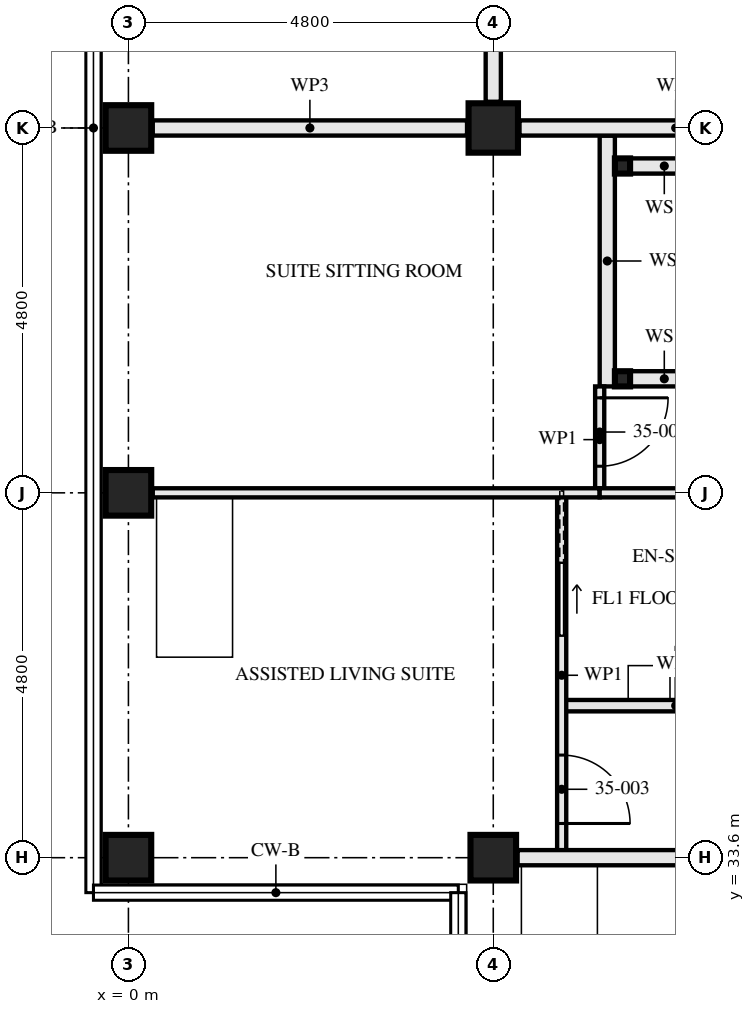
"""IFC4 building model, lengths in metres.
Left out: names, types, materials, properties, quantities, classifications, styles, units other than length and angle.
Written with IfcOpenShell. Run it as: python <this file> out.ifc"""

import sys

from ifc_helpers import new_model, si_unit, direction, frame, frame_2d, origin, origin_2d, place, context, subcontext, project, spatial, rectangle, hollow_rectangle, extrude, element, fill, save


model = new_model("IFC4")
c1 = context("Model", 3, precision=1e-05, world=origin(), true_north=direction((0.0, 1.0)))
c2 = subcontext(c1, "Body", "Model", "MODEL_VIEW")
j1 = project(units=[si_unit("LENGTHUNIT", "METRE"), si_unit("PLANEANGLEUNIT", "RADIAN")], contexts=[c1])
p1 = place(None, origin())
s1 = spatial("IfcSite", under=j1, at=p1, CompositionType="ELEMENT")
p2 = place(p1, origin())
s2 = spatial("IfcBuilding", under=s1, at=p2, CompositionType="ELEMENT")
p3 = place(p2, frame((0.0, 0.0, 129.5)))
s3 = spatial("IfcBuildingStorey", under=s2, at=p3, CompositionType="ELEMENT", Elevation=129.5)
for number, where, z_axis, x_axis in (
    (1, (0.0, 33.6, 0.0), (0.0, 0.0, 1.0), (0.0, 1.0, 0.0)),
    (2, (0.0, 38.4, 0.0), (0.0, 0.0, 1.0), (1.0, 0.0, 0.0)),
    (3, (0.0, 43.2, 0.0), (0.0, 0.0, 1.0), (0.0, 1.0, 0.0)),
    (4, (4.8, 33.6, 0.0), (0.0, 0.0, 1.0), (0.0, 1.0, 0.0)),
):
    element("IfcColumn", number, at=place(p3, frame(where, z_axis=z_axis, x_axis=x_axis)), inside=s3, PredefinedType="COLUMN", context=c2, shape_type="SweptSolid", body=[
        extrude(hollow_rectangle(XDim=0.6, YDim=0.6, WallThickness=0.08, at=origin_2d()), origin(), (0.0, 0.0, 1.0), 3.5),
    ])
p4 = place(p3, frame((4.8, 43.2, 0.0), z_axis=(0.0, 0.0, 1.0), x_axis=(0.0, 1.0, 0.0)))
e5 = element("IfcColumn", 5, at=p4, inside=s3, PredefinedType="COLUMN", context=c2, shape_type="SweptSolid", body=[
    extrude(hollow_rectangle(XDim=0.65, YDim=0.65, WallThickness=0.05, at=origin_2d()), origin(), (0.0, 0.0, 1.0), 3.5),
])
for number, where, z_axis, x_axis in (
    (6, (6.5, 42.7, 0.0), (0.0, 0.0, 1.0), (1.0, 0.0, 0.0)),
    (7, (6.5, 39.9, 0.0), (0.0, 0.0, 1.0), (1.0, 0.0, 0.0)),
):
    element("IfcColumn", number, at=place(p3, frame(where, z_axis=z_axis, x_axis=x_axis)), inside=s3, PredefinedType="COLUMN", context=c2, shape_type="SweptSolid", body=[
        extrude(hollow_rectangle(XDim=0.2, YDim=0.2, WallThickness=0.008, at=origin_2d()), origin(), (0.0, 0.0, 1.0), 3.33),
    ])
for number, where, z_axis, x_axis in (
    (8, (6.6, 42.7, 0.0), (0.0, 0.0, 1.0), (1.0, 0.0, 0.0)),
    (9, (6.6, 39.9, 0.0), (0.0, 0.0, 1.0), (1.0, 0.0, 0.0)),
):
    element("IfcWall", number, at=place(p3, frame(where, z_axis=z_axis, x_axis=x_axis)), inside=s3, PredefinedType="SOLIDWALL", context=c2, shape_type="SweptSolid", body=[
        extrude(rectangle(XDim=0.9, YDim=0.2, at=frame_2d((0.45, 0.0))), origin(), (0.0, 0.0, 1.0), 2.99),
    ])
p5 = place(p3, frame((6.3, 43.1, 0.0), z_axis=(0.0, 0.0, 1.0), x_axis=(0.0, -1.0, 0.0)))
e10 = element("IfcWall", 10, at=p5, inside=s3, PredefinedType="SOLIDWALL", context=c2, shape_type="SweptSolid", body=[
    extrude(rectangle(XDim=3.3, YDim=0.2, at=frame_2d((1.65, 0.0))), origin(), (0.0, 0.0, 1.0), 3.33),
])
p6 = place(p3, frame((5.7, 35.6, 0.0), z_axis=(0.0, 0.0, 1.0), x_axis=(1.0, 0.0, 0.0)))
e11 = element("IfcWall", 11, at=p6, inside=s3, PredefinedType="PARTITIONING", context=c2, shape_type="SweptSolid", body=[
    extrude(rectangle(XDim=3.0, YDim=0.15, at=frame_2d((1.5, 0.0))), origin(), (0.0, 0.0, 1.0), 3.33),
])
p7 = place(p3, frame((6.2, 38.4, 0.0), z_axis=(0.0, 0.0, 1.0), x_axis=(1.0, 0.0, 0.0)))
e12 = element("IfcWall", 12, at=p7, inside=s3, PredefinedType="PARTITIONING", context=c2, shape_type="SweptSolid", body=[
    extrude(rectangle(XDim=6.25, YDim=0.12, at=frame_2d((3.125, 0.0))), origin(), (0.0, 0.0, 1.0), 2.55),
])
p8 = place(p7, frame((3.9, 0.0, 0.0)))
e13 = element("IfcOpeningElement", 13, at=p8, cuts=e12, PredefinedType="OPENING", context=c2, shape_type="SweptSolid", body=[
    extrude(rectangle(XDim=0.9, YDim=2.1, at=frame_2d((0.45, 1.05))), frame((0.0, 0.071, 0.0), z_axis=(0.0, -1.0, 0.0), x_axis=(1.0, 0.0, 0.0)), (0.0, 0.0, 1.0), 0.141),
])
p9 = place(p3, frame((6.2, 39.8, 0.0), z_axis=(0.0, 0.0, 1.0), x_axis=(0.0, -1.0, 0.0)))
e14 = element("IfcWall", 14, at=p9, inside=s3, PredefinedType="PARTITIONING", context=c2, shape_type="SweptSolid", body=[
    extrude(rectangle(XDim=1.4, YDim=0.12, at=frame_2d((0.7, 0.0))), origin(), (0.0, 0.0, 1.0), 3.33),
])
p10 = place(p9, frame((0.15, 0.0, 0.0)))
e15 = element("IfcOpeningElement", 15, at=p10, cuts=e14, PredefinedType="OPENING", context=c2, shape_type="SweptSolid", body=[
    extrude(rectangle(XDim=0.9, YDim=2.1, at=frame_2d((0.45, 1.05))), frame((0.0, 0.071, 0.0), z_axis=(0.0, -1.0, 0.0), x_axis=(1.0, 0.0, 0.0)), (0.0, 0.0, 1.0), 0.141),
])
p11 = place(p3, frame((5.7, 38.4, 0.0), z_axis=(0.0, 0.0, 1.0), x_axis=(0.0, -1.0, 0.0)))
e16 = element("IfcWall", 16, at=p11, inside=s3, PredefinedType="PARTITIONING", context=c2, shape_type="SweptSolid", body=[
    extrude(rectangle(XDim=4.8, YDim=0.12, at=frame_2d((2.4, 0.0))), origin(), (0.0, 0.0, 1.0), 3.33),
])
p12 = place(p11, frame((3.45, 0.0, 0.0)))
e17 = element("IfcOpeningElement", 17, at=p12, cuts=e16, PredefinedType="OPENING", context=c2, shape_type="SweptSolid", body=[
    extrude(rectangle(XDim=0.9, YDim=2.1, at=frame_2d((0.45, 1.05))), frame((0.0, 0.071, 0.0), z_axis=(0.0, -1.0, 0.0), x_axis=(1.0, 0.0, 0.0)), (0.0, 0.0, 1.0), 0.141),
])
p13 = place(p11, frame((0.925, 0.0, 0.0)))
e18 = element("IfcOpeningElement", 18, at=p13, cuts=e16, PredefinedType="OPENING", context=c2, shape_type="SweptSolid", body=[
    extrude(rectangle(XDim=0.95, YDim=2.1, at=frame_2d((0.475, 1.05))), frame((0.0, 0.071, 0.0), z_axis=(0.0, -1.0, 0.0), x_axis=(1.0, 0.0, 0.0)), (0.0, 0.0, 1.0), 0.141),
])
p14 = place(p3, frame((0.32, 38.4, 0.0), z_axis=(0.0, 0.0, 1.0), x_axis=(1.0, 0.0, 0.0)))
e19 = element("IfcWall", 19, at=p14, inside=s3, PredefinedType="PARTITIONING", context=c2, shape_type="SweptSolid", body=[
    extrude(rectangle(XDim=5.88, YDim=0.12, at=frame_2d((2.94, 0.0))), origin(), (0.0, 0.0, 1.0), 2.55),
])
p15 = place(p3, frame((5.12, 33.6, 0.0), z_axis=(0.0, 0.0, 1.0), x_axis=(1.0, 0.0, 0.0)))
e20 = element("IfcWall", 20, at=p15, inside=s3, PredefinedType="PARTITIONING", context=c2, shape_type="SweptSolid", body=[
    extrude(rectangle(XDim=7.28, YDim=0.2, at=frame_2d((3.64, 0.0))), origin(), (0.0, 0.0, 1.0), 2.55),
])
p16 = place(p3, frame((4.8, 45.2, 0.0), z_axis=(0.0, 0.0, 1.0), x_axis=(0.0, -1.0, 0.0)))
e21 = element("IfcWall", 21, at=p16, inside=s3, PredefinedType="PARTITIONING", context=c2, shape_type="SweptSolid", body=[
    extrude(rectangle(XDim=1.655, YDim=0.2, at=frame_2d((0.828, 0.0))), origin(), (0.0, 0.0, 1.0), 3.33),
])
p17 = place(p3, frame((9.255, 43.2, 0.0), z_axis=(0.0, 0.0, 1.0), x_axis=(-1.0, 0.0, 0.0)))
e22 = element("IfcWall", 22, at=p17, inside=s3, PredefinedType="PARTITIONING", context=c2, shape_type="SweptSolid", body=[
    extrude(rectangle(XDim=4.11, YDim=0.2, at=frame_2d((2.055, 0.0))), origin(), (0.0, 0.0, 1.0), 2.32),
])
p18 = place(p3, frame((4.455, 43.2, 0.0), z_axis=(0.0, 0.0, 1.0), x_axis=(-1.0, 0.0, 0.0)))
e23 = element("IfcWall", 23, at=p18, inside=s3, PredefinedType="PARTITIONING", context=c2, shape_type="SweptSolid", body=[
    extrude(rectangle(XDim=4.135, YDim=0.2, at=frame_2d((2.067, 0.0))), origin(), (0.0, 0.0, 1.0), 2.32),
])
p19 = place(p10, origin())
e24 = element("IfcDoor", 24, at=p19, inside=s3, OperationType="SINGLE_SWING_RIGHT", PredefinedType="DOOR", context=c2, shape_type="SweptSolid", body=[
    extrude(rectangle(XDim=0.9, YDim=2.1, at=frame_2d((0.45, 1.05))), frame((0.0, 0.022, 0.0), z_axis=(0.0, -1.0, 0.0), x_axis=(1.0, 0.0, 0.0)), (0.0, 0.0, 1.0), 0.044),
])
fill(e15, e24)
p20 = place(p12, origin())
e25 = element("IfcDoor", 25, at=p20, inside=s3, OperationType="SINGLE_SWING_LEFT", PredefinedType="DOOR", context=c2, shape_type="SweptSolid", body=[
    extrude(rectangle(XDim=0.9, YDim=2.1, at=frame_2d((0.45, 1.05))), frame((0.0, 0.022, 0.0), z_axis=(0.0, -1.0, 0.0), x_axis=(1.0, 0.0, 0.0)), (0.0, 0.0, 1.0), 0.044),
])
fill(e17, e25)
p21 = place(p13, origin())
e26 = element("IfcDoor", 26, at=p21, inside=s3, OperationType="SLIDING_TO_RIGHT", PredefinedType="DOOR", context=c2, shape_type="SweptSolid", body=[
    extrude(rectangle(XDim=0.95, YDim=2.1, at=frame_2d((0.475, 1.05))), frame((0.0, 0.022, 0.0), z_axis=(0.0, -1.0, 0.0), x_axis=(1.0, 0.0, 0.0)), (0.0, 0.0, 1.0), 0.044),
])
fill(e18, e26)
save(model, sys.argv[1])
